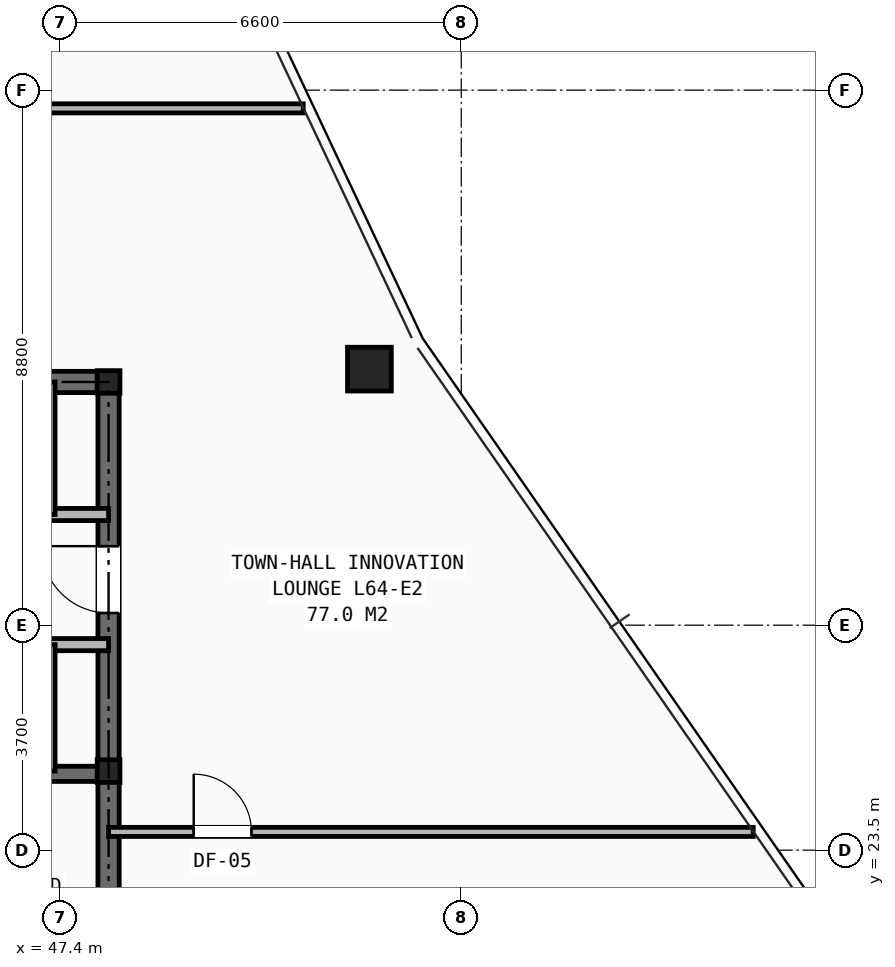
"""IFC4 building model, lengths in metres.
Left out: names, types, materials, properties, quantities, classifications, styles, units other than length and angle.
Written with IfcOpenShell. Run it as: python <this file> out.ifc"""

import sys

from ifc_helpers import new_model, si_unit, direction, frame, frame_2d, origin, origin_2d, place, context, subcontext, project, spatial, rectangle, hollow_rectangle, i_section, extrude, element, fill, save


model = new_model("IFC4")
c1 = context("Model", 3, precision=1e-05, world=origin(), true_north=direction((0.0, 1.0)))
c2 = subcontext(c1, "Body", "Model", "MODEL_VIEW")
j1 = project(units=[si_unit("LENGTHUNIT", "METRE"), si_unit("PLANEANGLEUNIT", "RADIAN")], contexts=[c1])
p1 = place(None, origin())
s1 = spatial("IfcSite", under=j1, at=p1, CompositionType="ELEMENT")
p2 = place(p1, origin())
s2 = spatial("IfcBuilding", under=s1, at=p2, CompositionType="ELEMENT")
p3 = place(p2, frame((0.0, 0.0, 225.9)))
s3 = spatial("IfcBuildingStorey", under=s2, at=p3, CompositionType="ELEMENT", Elevation=225.9)
for number, where, z_axis, x_axis in (
    (1, (48.2, 24.8, 0.0), (0.0, 0.0, 1.0), (1.0, 0.0, 0.0)),
    (2, (48.2, 31.2, 0.0), (0.0, 0.0, 1.0), (1.0, 0.0, 0.0)),
):
    element("IfcColumn", number, at=place(p3, frame(where, z_axis=z_axis, x_axis=x_axis)), inside=s3, PredefinedType="COLUMN", context=c2, shape_type="SweptSolid", body=[
        extrude(i_section(OverallWidth=0.374, OverallDepth=0.372, WebThickness=0.016, FlangeThickness=0.026, at=origin_2d()), origin(), (0.0, 0.0, 1.0), 3.5),
    ])
p4 = place(p3, frame((52.49, 31.411, 0.0), z_axis=(0.0, 0.0, 1.0), x_axis=(1.0, 0.0, 0.0)))
e3 = element("IfcColumn", 3, at=p4, inside=s3, PredefinedType="COLUMN", context=c2, shape_type="SweptSolid", body=[
    extrude(hollow_rectangle(XDim=0.72, YDim=0.72, WallThickness=0.05, at=origin_2d()), origin(), (0.0, 0.0, 1.0), 3.5),
])
p5 = place(p3, frame((31.8, 31.2, 0.0), z_axis=(0.0, 0.0, 1.0), x_axis=(1.0, 0.0, 0.0)))
e4 = element("IfcWall", 4, at=p5, inside=s3, PredefinedType="SHEAR", context=c2, shape_type="SweptSolid", body=[
    extrude(rectangle(XDim=16.4, YDim=0.35, at=frame_2d((8.2, 0.0))), origin(), (0.0, 0.0, 1.0), 3.25),
])
p6 = place(p3, frame((48.2, 16.4, 0.0), z_axis=(0.0, 0.0, 1.0), x_axis=(0.0, 1.0, 0.0)))
e5 = element("IfcWall", 5, at=p6, inside=s3, PredefinedType="SHEAR", context=c2, shape_type="SweptSolid", body=[
    extrude(rectangle(XDim=14.8, YDim=0.35, at=frame_2d((7.4, 0.0))), origin(), (0.0, 0.0, 1.0), 3.25),
])
p7 = place(p6, frame((11.0, 0.0, 0.0)))
e6 = element("IfcOpeningElement", 6, at=p7, cuts=e5, PredefinedType="OPENING", context=c2, shape_type="SweptSolid", body=[
    extrude(rectangle(XDim=1.1, YDim=2.15, at=frame_2d((0.55, 1.075))), frame((0.0, 0.185, 0.0), z_axis=(0.0, -1.0, 0.0), x_axis=(1.0, 0.0, 0.0)), (0.0, 0.0, 1.0), 0.37),
])
p8 = place(p3, frame((44.955, 24.755, 0.0), z_axis=(0.0, 0.0, 1.0), x_axis=(1.0, 0.0, 0.0)))
e7 = element("IfcWall", 7, at=p8, inside=s3, PredefinedType="SHEAR", context=c2, shape_type="SweptSolid", body=[
    extrude(rectangle(XDim=3.245, YDim=0.25, at=frame_2d((1.623, 0.0))), origin(), (0.0, 0.0, 1.0), 3.25),
])
p9 = place(p3, frame((33.82, 29.02, 0.0), z_axis=(0.0, 0.0, 1.0), x_axis=(1.0, 0.0, 0.0)))
e8 = element("IfcWall", 8, at=p9, inside=s3, PredefinedType="SOLIDWALL", context=c2, shape_type="SweptSolid", body=[
    extrude(rectangle(XDim=14.38, YDim=0.2, at=frame_2d((7.19, 0.0))), origin(), (0.0, 0.0, 1.0), 2.705),
])
p10 = place(p9, frame((3.92, 0.0, 0.0)))
e9 = element("IfcOpeningElement", 9, at=p10, cuts=e8, PredefinedType="OPENING", context=c2, shape_type="SweptSolid", body=[
    extrude(rectangle(XDim=0.9, YDim=2.1, at=frame_2d((0.45, 1.05))), frame((0.0, 0.11, 0.0), z_axis=(0.0, -1.0, 0.0), x_axis=(1.0, 0.0, 0.0)), (0.0, 0.0, 1.0), 0.22),
])
p11 = place(p9, frame((9.39, 0.0, 0.0)))
e10 = element("IfcOpeningElement", 10, at=p11, cuts=e8, PredefinedType="OPENING", context=c2, shape_type="SweptSolid", body=[
    extrude(rectangle(XDim=1.1, YDim=2.15, at=frame_2d((0.55, 1.075))), frame((0.0, 0.11, 0.0), z_axis=(0.0, -1.0, 0.0), x_axis=(1.0, 0.0, 0.0)), (0.0, 0.0, 1.0), 0.22),
])
p12 = place(p9, frame((11.71, 0.0, 0.0)))
e11 = element("IfcOpeningElement", 11, at=p12, cuts=e8, PredefinedType="OPENING", context=c2, shape_type="SweptSolid", body=[
    extrude(rectangle(XDim=1.1, YDim=2.15, at=frame_2d((0.55, 1.075))), frame((0.0, 0.11, 0.0), z_axis=(0.0, -1.0, 0.0), x_axis=(1.0, 0.0, 0.0)), (0.0, 0.0, 1.0), 0.22),
])
p13 = place(p3, frame((33.82, 26.88, 0.0), z_axis=(0.0, 0.0, 1.0), x_axis=(1.0, 0.0, 0.0)))
e12 = element("IfcWall", 12, at=p13, inside=s3, PredefinedType="SOLIDWALL", context=c2, shape_type="SweptSolid", body=[
    extrude(rectangle(XDim=14.38, YDim=0.2, at=frame_2d((7.19, 0.0))), origin(), (0.0, 0.0, 1.0), 2.705),
])
p14 = place(p13, frame((1.78, 0.0, 0.0)))
e13 = element("IfcOpeningElement", 13, at=p14, cuts=e12, PredefinedType="OPENING", context=c2, shape_type="SweptSolid", body=[
    extrude(rectangle(XDim=0.9, YDim=2.1, at=frame_2d((0.45, 1.05))), frame((0.0, 0.11, 0.0), z_axis=(0.0, -1.0, 0.0), x_axis=(1.0, 0.0, 0.0)), (0.0, 0.0, 1.0), 0.22),
])
p15 = place(p13, frame((6.07, 0.0, 0.0)))
e14 = element("IfcOpeningElement", 14, at=p15, cuts=e12, PredefinedType="OPENING", context=c2, shape_type="SweptSolid", body=[
    extrude(rectangle(XDim=0.9, YDim=2.1, at=frame_2d((0.45, 1.05))), frame((0.0, 0.11, 0.0), z_axis=(0.0, -1.0, 0.0), x_axis=(1.0, 0.0, 0.0)), (0.0, 0.0, 1.0), 0.22),
])
p16 = place(p13, frame((9.39, 0.0, 0.0)))
e15 = element("IfcOpeningElement", 15, at=p16, cuts=e12, PredefinedType="OPENING", context=c2, shape_type="SweptSolid", body=[
    extrude(rectangle(XDim=1.1, YDim=2.15, at=frame_2d((0.55, 1.075))), frame((0.0, 0.11, 0.0), z_axis=(0.0, -1.0, 0.0), x_axis=(1.0, 0.0, 0.0)), (0.0, 0.0, 1.0), 0.22),
])
p17 = place(p13, frame((11.71, 0.0, 0.0)))
e16 = element("IfcOpeningElement", 16, at=p17, cuts=e12, PredefinedType="OPENING", context=c2, shape_type="SweptSolid", body=[
    extrude(rectangle(XDim=1.1, YDim=2.15, at=frame_2d((0.55, 1.075))), frame((0.0, 0.11, 0.0), z_axis=(0.0, -1.0, 0.0), x_axis=(1.0, 0.0, 0.0)), (0.0, 0.0, 1.0), 0.22),
])
p18 = place(p3, frame((47.24, 29.02, 0.0), z_axis=(0.0, 0.0, 1.0), x_axis=(0.0, 1.0, 0.0)))
e17 = element("IfcWall", 17, at=p18, inside=s3, PredefinedType="SOLIDWALL", context=c2, shape_type="SweptSolid", body=[
    extrude(rectangle(XDim=2.18, YDim=0.16, at=frame_2d((1.09, 0.0))), origin(), (0.0, 0.0, 1.0), 2.705),
])
p19 = place(p3, frame((47.24, 24.8, 0.0), z_axis=(0.0, 0.0, 1.0), x_axis=(0.0, 1.0, 0.0)))
e18 = element("IfcWall", 18, at=p19, inside=s3, PredefinedType="SOLIDWALL", context=c2, shape_type="SweptSolid", body=[
    extrude(rectangle(XDim=2.08, YDim=0.16, at=frame_2d((1.04, 0.0))), origin(), (0.0, 0.0, 1.0), 3.25),
])
p20 = place(p3, frame((46.8, 35.7, 0.0), z_axis=(0.0, 0.0, 1.0), x_axis=(1.0, 0.0, 0.0)))
e19 = element("IfcWall", 19, at=p20, inside=s3, PredefinedType="PARTITIONING", context=c2, shape_type="SweptSolid", body=[
    extrude(rectangle(XDim=4.602, YDim=0.15, at=frame_2d((2.301, 0.0))), origin(), (0.0, 0.0, 1.0), 2.628),
])
p21 = place(p3, frame((48.2, 23.8, 0.0), z_axis=(0.0, 0.0, 1.0), x_axis=(1.0, 0.0, 0.0)))
e20 = element("IfcWall", 20, at=p21, inside=s3, PredefinedType="PARTITIONING", context=c2, shape_type="SweptSolid", body=[
    extrude(rectangle(XDim=10.602, YDim=0.15, at=frame_2d((5.301, 0.0))), origin(), (0.0, 0.0, 1.0), 2.628),
])
p22 = place(p21, frame((1.4, 0.0, 0.0)))
e21 = element("IfcOpeningElement", 21, at=p22, cuts=e20, PredefinedType="OPENING", context=c2, shape_type="SweptSolid", body=[
    extrude(rectangle(XDim=0.95, YDim=2.1, at=frame_2d((0.475, 1.05))), frame((0.0, 0.085, 0.0), z_axis=(0.0, -1.0, 0.0), x_axis=(1.0, 0.0, 0.0)), (0.0, 0.0, 1.0), 0.17),
])
p23 = place(p7, origin())
e22 = element("IfcDoor", 22, at=p23, inside=s3, OperationType="SINGLE_SWING_RIGHT", PredefinedType="DOOR", context=c2, shape_type="SweptSolid", body=[
    extrude(rectangle(XDim=1.1, YDim=2.15, at=frame_2d((0.55, 1.075))), frame((0.0, 0.025, 0.0), z_axis=(0.0, -1.0, 0.0), x_axis=(1.0, 0.0, 0.0)), (0.0, 0.0, 1.0), 0.05),
])
fill(e6, e22)
p24 = place(p22, origin())
e23 = element("IfcDoor", 23, at=p24, inside=s3, OperationType="SINGLE_SWING_LEFT", PredefinedType="DOOR", context=c2, shape_type="SweptSolid", body=[
    extrude(rectangle(XDim=0.95, YDim=2.1, at=frame_2d((0.475, 1.05))), frame((0.0, 0.025, 0.0), z_axis=(0.0, -1.0, 0.0), x_axis=(1.0, 0.0, 0.0)), (0.0, 0.0, 1.0), 0.05),
])
fill(e21, e23)
save(model, sys.argv[1])
